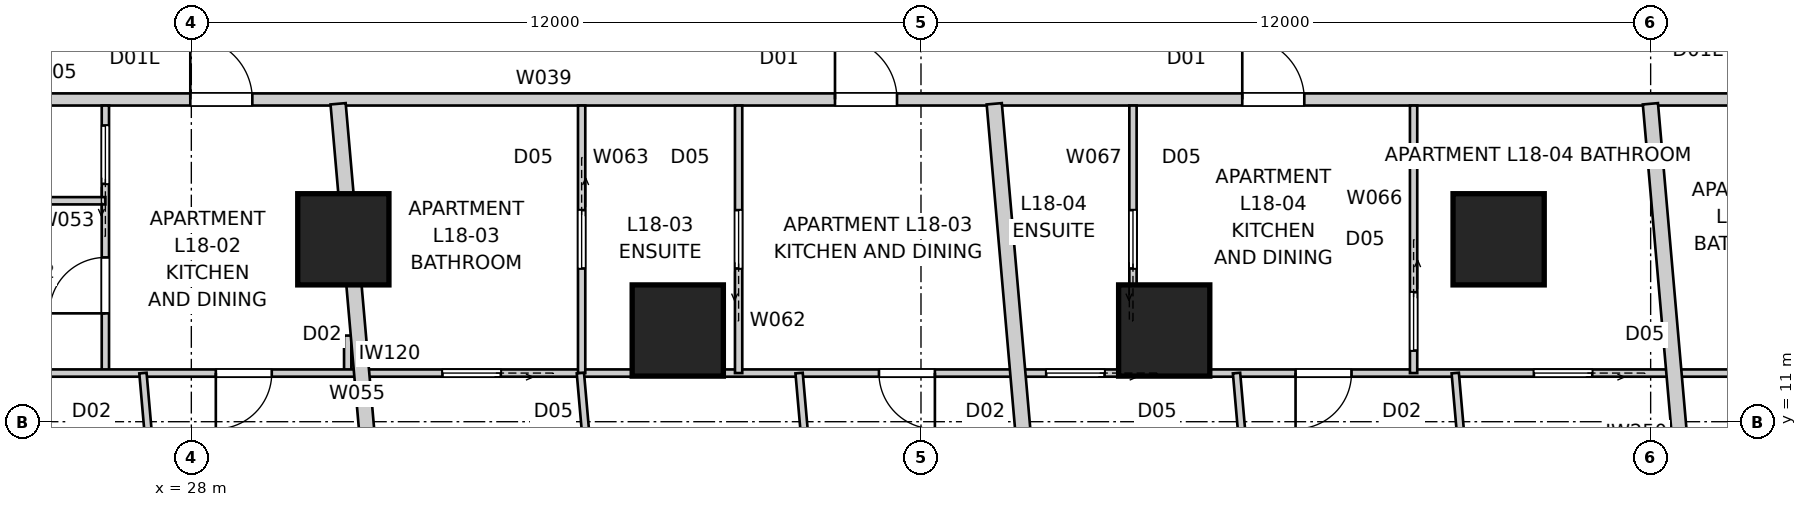
"""IFC4 building model, lengths in metres.
Left out: names, types, materials, properties, quantities, classifications, styles, units other than length and angle.
Written with IfcOpenShell. Run it as: python <this file> out.ifc"""

import sys

from ifc_helpers import new_model, si_unit, direction, frame, frame_2d, origin, origin_2d, place, context, subcontext, project, spatial, rectangle, extrude, element, fill, save


model = new_model("IFC4")
c1 = context("Model", 3, precision=1e-05, world=origin(), true_north=direction((0.0, 1.0)))
c2 = subcontext(c1, "Body", "Model", "MODEL_VIEW")
j1 = project(units=[si_unit("LENGTHUNIT", "METRE"), si_unit("PLANEANGLEUNIT", "RADIAN")], contexts=[c1])
p1 = place(None, origin())
s1 = spatial("IfcSite", under=j1, at=p1, CompositionType="ELEMENT")
p2 = place(p1, origin())
s2 = spatial("IfcBuilding", under=s1, at=p2, CompositionType="ELEMENT")
p3 = place(p2, frame((0.0, 0.0, 67.6)))
s3 = spatial("IfcBuildingStorey", under=s2, at=p3, CompositionType="ELEMENT", Elevation=67.6)
for number, where, z_axis, x_axis in (
    (1, (30.5, 14.0, 0.0), (0.0, 0.0, 1.0), (1.0, 0.0, 0.0)),
    (2, (36.0, 12.5, 0.0), (0.0, 0.0, 1.0), (1.0, 0.0, 0.0)),
    (3, (44.0, 12.5, 0.0), (0.0, 0.0, 1.0), (1.0, 0.0, 0.0)),
    (4, (49.5, 14.0, 0.0), (0.0, 0.0, 1.0), (1.0, 0.0, 0.0)),
):
    element("IfcColumn", number, at=place(p3, frame(where, z_axis=z_axis, x_axis=x_axis)), inside=s3, PredefinedType="COLUMN", context=c2, shape_type="SweptSolid", body=[
        extrude(rectangle(XDim=1.5, YDim=1.5, at=origin_2d()), origin(), (0.0, 0.0, 1.0), 3.4),
    ])
p4 = place(p3, frame((25.5, 16.3, 0.0), z_axis=(0.0, 0.0, 1.0), x_axis=(1.0, 0.0, 0.0)))
e5 = element("IfcWall", 5, at=p4, inside=s3, PredefinedType="PARTITIONING", context=c2, shape_type="SweptSolid", body=[
    extrude(rectangle(XDim=28.2, YDim=0.2, at=frame_2d((14.1, 0.0))), origin(), (0.0, 0.0, 1.0), 3.25),
])
p5 = place(p4, frame((19.784, 0.0, 0.0)))
e6 = element("IfcOpeningElement", 6, at=p5, cuts=e5, PredefinedType="OPENING", context=c2, shape_type="SweptSolid", body=[
    extrude(rectangle(XDim=1.02, YDim=2.34, at=frame_2d((0.51, 1.17))), frame((0.0, 0.11, 0.0), z_axis=(0.0, -1.0, 0.0), x_axis=(1.0, 0.0, 0.0)), (0.0, 0.0, 1.0), 0.22),
])
p6 = place(p4, frame((13.086, 0.0, 0.0)))
e7 = element("IfcOpeningElement", 7, at=p6, cuts=e5, PredefinedType="OPENING", context=c2, shape_type="SweptSolid", body=[
    extrude(rectangle(XDim=1.02, YDim=2.34, at=frame_2d((0.51, 1.17))), frame((0.0, 0.11, 0.0), z_axis=(0.0, -1.0, 0.0), x_axis=(1.0, 0.0, 0.0)), (0.0, 0.0, 1.0), 0.22),
])
p7 = place(p4, frame((2.483, 0.0, 0.0)))
e8 = element("IfcOpeningElement", 8, at=p7, cuts=e5, PredefinedType="OPENING", context=c2, shape_type="SweptSolid", body=[
    extrude(rectangle(XDim=1.02, YDim=2.1, at=frame_2d((0.51, 1.05))), frame((0.0, 0.11, 0.0), z_axis=(0.0, -1.0, 0.0), x_axis=(1.0, 0.0, 0.0)), (0.0, 0.0, 1.0), 0.22),
])
p8 = place(p3, frame((42.222, 4.597, 0.0), z_axis=(0.0, 0.0, 1.0), x_axis=(-0.087147497287, 0.996195419442, 0.0)))
e9 = element("IfcWall", 9, at=p8, inside=s3, PredefinedType="PARTITIONING", context=c2, shape_type="SweptSolid", body=[
    extrude(rectangle(XDim=11.677, YDim=0.25, at=frame_2d((5.838, 0.0))), origin(), (0.0, 0.0, 1.0), 3.25),
])
p9 = place(p3, frame((52.932, 5.534, 0.0), z_axis=(0.0, 0.0, 1.0), x_axis=(-0.08716441141, 0.996193939644, 0.0)))
e10 = element("IfcWall", 10, at=p9, inside=s3, PredefinedType="PARTITIONING", context=c2, shape_type="SweptSolid", body=[
    extrude(rectangle(XDim=10.736, YDim=0.25, at=frame_2d((5.368, 0.0))), origin(), (0.0, 0.0, 1.0), 3.25),
])
p10 = place(p3, frame((31.513, 3.66, 0.0), z_axis=(0.0, 0.0, 1.0), x_axis=(-0.087153988028, 0.996194851608, 0.0)))
e11 = element("IfcWall", 11, at=p10, inside=s3, PredefinedType="PARTITIONING", context=c2, shape_type="SweptSolid", body=[
    extrude(rectangle(XDim=12.617, YDim=0.25, at=frame_2d((6.309, 0.0))), origin(), (0.0, 0.0, 1.0), 3.25),
])
p11 = place(p3, frame((26.586, 11.8, 0.0), z_axis=(0.0, 0.0, 1.0), x_axis=(0.0, 1.0, 0.0)))
e12 = element("IfcWall", 12, at=p11, inside=s3, PredefinedType="PARTITIONING", context=c2, shape_type="SweptSolid", body=[
    extrude(rectangle(XDim=4.4, YDim=0.12, at=frame_2d((2.2, 0.0))), origin(), (0.0, 0.0, 1.0), 3.25),
])
p12 = place(p11, frame((0.982, 0.0, 0.0)))
e13 = element("IfcOpeningElement", 13, at=p12, cuts=e12, PredefinedType="OPENING", context=c2, shape_type="SweptSolid", body=[
    extrude(rectangle(XDim=0.92, YDim=2.34, at=frame_2d((0.46, 1.17))), frame((0.0, 0.07, 0.0), z_axis=(0.0, -1.0, 0.0), x_axis=(1.0, 0.0, 0.0)), (0.0, 0.0, 1.0), 0.14),
])
p13 = place(p11, frame((3.112, 0.0, 0.0)))
e14 = element("IfcOpeningElement", 14, at=p13, cuts=e12, PredefinedType="OPENING", context=c2, shape_type="SweptSolid", body=[
    extrude(rectangle(XDim=0.96, YDim=2.1, at=frame_2d((0.48, 1.05))), frame((0.0, 0.07, 0.0), z_axis=(0.0, -1.0, 0.0), x_axis=(1.0, 0.0, 0.0)), (0.0, 0.0, 1.0), 0.14),
])
p14 = place(p3, frame((30.572, 12.417, 0.0), z_axis=(0.0, 0.0, 1.0), x_axis=(0.0, -1.0, 0.0)))
e15 = element("IfcWall", 15, at=p14, inside=s3, PredefinedType="PARTITIONING", context=c2, shape_type="SweptSolid", body=[
    extrude(rectangle(XDim=0.617, YDim=0.12, at=frame_2d((0.308, 0.0))), origin(), (0.0, 0.0, 1.0), 3.25),
])
p15 = place(p3, frame((58.2, 11.8, 0.0), z_axis=(0.0, 0.0, 1.0), x_axis=(-1.0, 0.0, 0.0)))
e16 = element("IfcWall", 16, at=p15, inside=s3, PredefinedType="PARTITIONING", context=c2, shape_type="SweptSolid", body=[
    extrude(rectangle(XDim=36.4, YDim=0.12, at=frame_2d((18.2, 0.0))), origin(), (0.0, 0.0, 1.0), 3.25),
])
p16 = place(p15, frame((11.12, 0.0, 0.0)))
e17 = element("IfcOpeningElement", 17, at=p16, cuts=e16, PredefinedType="OPENING", context=c2, shape_type="SweptSolid", body=[
    extrude(rectangle(XDim=0.92, YDim=2.34, at=frame_2d((0.46, 1.17))), frame((0.0, 0.07, 0.0), z_axis=(0.0, -1.0, 0.0), x_axis=(1.0, 0.0, 0.0)), (0.0, 0.0, 1.0), 0.14),
])
p17 = place(p15, frame((17.971, 0.0, 0.0)))
e18 = element("IfcOpeningElement", 18, at=p17, cuts=e16, PredefinedType="OPENING", context=c2, shape_type="SweptSolid", body=[
    extrude(rectangle(XDim=0.92, YDim=2.34, at=frame_2d((0.46, 1.17))), frame((0.0, 0.07, 0.0), z_axis=(0.0, -1.0, 0.0), x_axis=(1.0, 0.0, 0.0)), (0.0, 0.0, 1.0), 0.14),
])
p18 = place(p15, frame((28.877, 0.0, 0.0)))
e19 = element("IfcOpeningElement", 19, at=p18, cuts=e16, PredefinedType="OPENING", context=c2, shape_type="SweptSolid", body=[
    extrude(rectangle(XDim=0.92, YDim=2.34, at=frame_2d((0.46, 1.17))), frame((0.0, 0.07, 0.0), z_axis=(0.0, -1.0, 0.0), x_axis=(1.0, 0.0, 0.0)), (0.0, 0.0, 1.0), 0.14),
])
p19 = place(p15, frame((7.16, 0.0, 0.0)))
e20 = element("IfcOpeningElement", 20, at=p19, cuts=e16, PredefinedType="OPENING", context=c2, shape_type="SweptSolid", body=[
    extrude(rectangle(XDim=0.96, YDim=2.1, at=frame_2d((0.48, 1.05))), frame((0.0, 0.07, 0.0), z_axis=(0.0, -1.0, 0.0), x_axis=(1.0, 0.0, 0.0)), (0.0, 0.0, 1.0), 0.14),
])
p20 = place(p15, frame((15.181, 0.0, 0.0)))
e21 = element("IfcOpeningElement", 21, at=p20, cuts=e16, PredefinedType="OPENING", context=c2, shape_type="SweptSolid", body=[
    extrude(rectangle(XDim=0.96, YDim=2.1, at=frame_2d((0.48, 1.05))), frame((0.0, 0.07, 0.0), z_axis=(0.0, -1.0, 0.0), x_axis=(1.0, 0.0, 0.0)), (0.0, 0.0, 1.0), 0.14),
])
p21 = place(p15, frame((32.668, 0.0, 0.0)))
e22 = element("IfcOpeningElement", 22, at=p21, cuts=e16, PredefinedType="OPENING", context=c2, shape_type="SweptSolid", body=[
    extrude(rectangle(XDim=0.92, YDim=2.34, at=frame_2d((0.46, 1.17))), frame((0.0, 0.07, 0.0), z_axis=(0.0, -1.0, 0.0), x_axis=(1.0, 0.0, 0.0)), (0.0, 0.0, 1.0), 0.14),
])
p22 = place(p15, frame((35.011, 0.0, 0.0)))
e23 = element("IfcOpeningElement", 23, at=p22, cuts=e16, PredefinedType="OPENING", context=c2, shape_type="SweptSolid", body=[
    extrude(rectangle(XDim=0.92, YDim=2.34, at=frame_2d((0.46, 1.17))), frame((0.0, 0.07, 0.0), z_axis=(0.0, -1.0, 0.0), x_axis=(1.0, 0.0, 0.0)), (0.0, 0.0, 1.0), 0.14),
])
p23 = place(p15, frame((0.675, 0.0, 0.0)))
e24 = element("IfcOpeningElement", 24, at=p23, cuts=e16, PredefinedType="OPENING", context=c2, shape_type="SweptSolid", body=[
    extrude(rectangle(XDim=0.92, YDim=2.34, at=frame_2d((0.46, 1.17))), frame((0.0, 0.07, 0.0), z_axis=(0.0, -1.0, 0.0), x_axis=(1.0, 0.0, 0.0)), (0.0, 0.0, 1.0), 0.14),
])
p24 = place(p15, frame((25.11, 0.0, 0.0)))
e25 = element("IfcOpeningElement", 25, at=p24, cuts=e16, PredefinedType="OPENING", context=c2, shape_type="SweptSolid", body=[
    extrude(rectangle(XDim=0.96, YDim=2.1, at=frame_2d((0.48, 1.05))), frame((0.0, 0.07, 0.0), z_axis=(0.0, -1.0, 0.0), x_axis=(1.0, 0.0, 0.0)), (0.0, 0.0, 1.0), 0.14),
])
p25 = place(p15, frame((3.904, 0.0, 0.0)))
e26 = element("IfcOpeningElement", 26, at=p25, cuts=e16, PredefinedType="OPENING", context=c2, shape_type="SweptSolid", body=[
    extrude(rectangle(XDim=0.96, YDim=2.1, at=frame_2d((0.48, 1.05))), frame((0.0, 0.07, 0.0), z_axis=(0.0, -1.0, 0.0), x_axis=(1.0, 0.0, 0.0)), (0.0, 0.0, 1.0), 0.14),
])
p26 = place(p3, frame((26.586, 14.634, 0.0), z_axis=(0.0, 0.0, 1.0), x_axis=(-1.0, 0.0, 0.0)))
e27 = element("IfcWall", 27, at=p26, inside=s3, PredefinedType="PARTITIONING", context=c2, shape_type="SweptSolid", body=[
    extrude(rectangle(XDim=4.786, YDim=0.12, at=frame_2d((2.393, 0.0))), origin(), (0.0, 0.0, 1.0), 3.25),
])
p27 = place(p3, frame((27.204, 11.8, 0.0), z_axis=(0.0, 0.0, 1.0), x_axis=(0.087167308925, -0.996193686115, 0.0)))
e28 = element("IfcWall", 28, at=p27, inside=s3, PredefinedType="PARTITIONING", context=c2, shape_type="SweptSolid", body=[
    extrude(rectangle(XDim=8.445, YDim=0.12, at=frame_2d((4.222, 0.0))), origin(), (0.0, 0.0, 1.0), 2.638),
])
p28 = place(p3, frame((37.0, 11.8, 0.0), z_axis=(0.0, 0.0, 1.0), x_axis=(0.0, 1.0, 0.0)))
e29 = element("IfcWall", 29, at=p28, inside=s3, PredefinedType="PARTITIONING", context=c2, shape_type="SweptSolid", body=[
    extrude(rectangle(XDim=4.4, YDim=0.12, at=frame_2d((2.2, 0.0))), origin(), (0.0, 0.0, 1.0), 2.796),
])
p29 = place(p28, frame((1.72, 0.0, 0.0)))
e30 = element("IfcOpeningElement", 30, at=p29, cuts=e29, PredefinedType="OPENING", context=c2, shape_type="SweptSolid", body=[
    extrude(rectangle(XDim=0.96, YDim=2.1, at=frame_2d((0.48, 1.05))), frame((0.0, 0.07, 0.0), z_axis=(0.0, -1.0, 0.0), x_axis=(1.0, 0.0, 0.0)), (0.0, 0.0, 1.0), 0.14),
])
p30 = place(p3, frame((34.419, 16.2, 0.0), z_axis=(0.0, 0.0, 1.0), x_axis=(0.0, -1.0, 0.0)))
e31 = element("IfcWall", 31, at=p30, inside=s3, PredefinedType="PARTITIONING", context=c2, shape_type="SweptSolid", body=[
    extrude(rectangle(XDim=4.4, YDim=0.12, at=frame_2d((2.2, 0.0))), origin(), (0.0, 0.0, 1.0), 3.25),
])
p31 = place(p30, frame((1.72, 0.0, 0.0)))
e32 = element("IfcOpeningElement", 32, at=p31, cuts=e31, PredefinedType="OPENING", context=c2, shape_type="SweptSolid", body=[
    extrude(rectangle(XDim=0.96, YDim=2.1, at=frame_2d((0.48, 1.05))), frame((0.0, 0.07, 0.0), z_axis=(0.0, -1.0, 0.0), x_axis=(1.0, 0.0, 0.0)), (0.0, 0.0, 1.0), 0.14),
])
p32 = place(p3, frame((34.398, 11.8, 0.0), z_axis=(0.0, 0.0, 1.0), x_axis=(0.087161914023, -0.996194158156, 0.0)))
e33 = element("IfcWall", 33, at=p32, inside=s3, PredefinedType="PARTITIONING", context=c2, shape_type="SweptSolid", body=[
    extrude(rectangle(XDim=7.818, YDim=0.12, at=frame_2d((3.909, 0.0))), origin(), (0.0, 0.0, 1.0), 3.25),
])
p33 = place(p32, frame((3.469, 0.0, 0.0)))
e34 = element("IfcOpeningElement", 34, at=p33, cuts=e33, PredefinedType="OPENING", context=c2, shape_type="SweptSolid", body=[
    extrude(rectangle(XDim=0.92, YDim=2.34, at=frame_2d((0.46, 1.17))), frame((0.0, 0.07, 0.0), z_axis=(0.0, -1.0, 0.0), x_axis=(1.0, 0.0, 0.0)), (0.0, 0.0, 1.0), 0.14),
])
p34 = place(p3, frame((37.995, 11.8, 0.0), z_axis=(0.0, 0.0, 1.0), x_axis=(0.08715887855, -0.99619442374, 0.0)))
e35 = element("IfcWall", 35, at=p34, inside=s3, PredefinedType="PARTITIONING", context=c2, shape_type="SweptSolid", body=[
    extrude(rectangle(XDim=7.504, YDim=0.12, at=frame_2d((3.752, 0.0))), origin(), (0.0, 0.0, 1.0), 3.25),
])
p35 = place(p3, frame((48.101, 16.2, 0.0), z_axis=(0.0, 0.0, 1.0), x_axis=(0.0, -1.0, 0.0)))
e36 = element("IfcWall", 36, at=p35, inside=s3, PredefinedType="PARTITIONING", context=c2, shape_type="SweptSolid", body=[
    extrude(rectangle(XDim=4.4, YDim=0.12, at=frame_2d((2.2, 0.0))), origin(), (0.0, 0.0, 1.0), 3.25),
])
p36 = place(p35, frame((3.07, 0.0, 0.0)))
e37 = element("IfcOpeningElement", 37, at=p36, cuts=e36, PredefinedType="OPENING", context=c2, shape_type="SweptSolid", body=[
    extrude(rectangle(XDim=0.96, YDim=2.1, at=frame_2d((0.48, 1.05))), frame((0.0, 0.07, 0.0), z_axis=(0.0, -1.0, 0.0), x_axis=(1.0, 0.0, 0.0)), (0.0, 0.0, 1.0), 0.14),
])
p37 = place(p3, frame((43.486, 11.8, 0.0), z_axis=(0.0, 0.0, 1.0), x_axis=(0.0, 1.0, 0.0)))
e38 = element("IfcWall", 38, at=p37, inside=s3, PredefinedType="PARTITIONING", context=c2, shape_type="SweptSolid", body=[
    extrude(rectangle(XDim=4.4, YDim=0.12, at=frame_2d((2.2, 0.0))), origin(), (0.0, 0.0, 1.0), 3.25),
])
p38 = place(p37, frame((1.72, 0.0, 0.0)))
e39 = element("IfcOpeningElement", 39, at=p38, cuts=e38, PredefinedType="OPENING", context=c2, shape_type="SweptSolid", body=[
    extrude(rectangle(XDim=0.96, YDim=2.1, at=frame_2d((0.48, 1.05))), frame((0.0, 0.07, 0.0), z_axis=(0.0, -1.0, 0.0), x_axis=(1.0, 0.0, 0.0)), (0.0, 0.0, 1.0), 0.14),
])
p39 = place(p3, frame((45.189, 11.8, 0.0), z_axis=(0.0, 0.0, 1.0), x_axis=(0.087190290923, -0.996191674914, 0.0)))
e40 = element("IfcWall", 40, at=p39, inside=s3, PredefinedType="PARTITIONING", context=c2, shape_type="SweptSolid", body=[
    extrude(rectangle(XDim=6.877, YDim=0.12, at=frame_2d((3.438, 0.0))), origin(), (0.0, 0.0, 1.0), 3.25),
])
p40 = place(p3, frame((48.786, 11.8, 0.0), z_axis=(0.0, 0.0, 1.0), x_axis=(0.087151261897, -0.996195090105, 0.0)))
e41 = element("IfcWall", 41, at=p40, inside=s3, PredefinedType="PARTITIONING", context=c2, shape_type="SweptSolid", body=[
    extrude(rectangle(XDim=6.563, YDim=0.12, at=frame_2d((3.282, 0.0))), origin(), (0.0, 0.0, 1.0), 3.25),
])
p41 = place(p5, origin())
e42 = element("IfcDoor", 42, at=p41, inside=s3, OperationType="SINGLE_SWING_LEFT", PredefinedType="DOOR", context=c2, shape_type="SweptSolid", body=[
    extrude(rectangle(XDim=1.02, YDim=2.34, at=frame_2d((0.51, 1.17))), frame((0.0, 0.025, 0.0), z_axis=(0.0, -1.0, 0.0), x_axis=(1.0, 0.0, 0.0)), (0.0, 0.0, 1.0), 0.05),
])
fill(e6, e42)
p42 = place(p6, origin())
e43 = element("IfcDoor", 43, at=p42, inside=s3, OperationType="SINGLE_SWING_LEFT", PredefinedType="DOOR", context=c2, shape_type="SweptSolid", body=[
    extrude(rectangle(XDim=1.02, YDim=2.34, at=frame_2d((0.51, 1.17))), frame((0.0, 0.025, 0.0), z_axis=(0.0, -1.0, 0.0), x_axis=(1.0, 0.0, 0.0)), (0.0, 0.0, 1.0), 0.05),
])
fill(e7, e43)
p43 = place(p7, origin())
e44 = element("IfcDoor", 44, at=p43, inside=s3, OperationType="SINGLE_SWING_LEFT", PredefinedType="DOOR", context=c2, shape_type="SweptSolid", body=[
    extrude(rectangle(XDim=1.02, YDim=2.1, at=frame_2d((0.51, 1.05))), frame((0.0, 0.025, 0.0), z_axis=(0.0, -1.0, 0.0), x_axis=(1.0, 0.0, 0.0)), (0.0, 0.0, 1.0), 0.05),
])
fill(e8, e44)
p44 = place(p36, origin())
e45 = element("IfcDoor", 45, at=p44, inside=s3, OperationType="SLIDING_TO_LEFT", PredefinedType="DOOR", context=c2, shape_type="SweptSolid", body=[
    extrude(rectangle(XDim=0.96, YDim=2.1, at=frame_2d((0.48, 1.05))), frame((0.0, 0.025, 0.0), z_axis=(0.0, -1.0, 0.0), x_axis=(1.0, 0.0, 0.0)), (0.0, 0.0, 1.0), 0.05),
])
fill(e37, e45)
p45 = place(p38, origin())
e46 = element("IfcDoor", 46, at=p45, inside=s3, OperationType="SLIDING_TO_LEFT", PredefinedType="DOOR", context=c2, shape_type="SweptSolid", body=[
    extrude(rectangle(XDim=0.96, YDim=2.1, at=frame_2d((0.48, 1.05))), frame((0.0, 0.025, 0.0), z_axis=(0.0, -1.0, 0.0), x_axis=(1.0, 0.0, 0.0)), (0.0, 0.0, 1.0), 0.05),
])
fill(e39, e46)
p46 = place(p16, origin())
e47 = element("IfcDoor", 47, at=p46, inside=s3, OperationType="SINGLE_SWING_RIGHT", PredefinedType="DOOR", context=c2, shape_type="SweptSolid", body=[
    extrude(rectangle(XDim=0.92, YDim=2.34, at=frame_2d((0.46, 1.17))), frame((0.0, 0.025, 0.0), z_axis=(0.0, -1.0, 0.0), x_axis=(1.0, 0.0, 0.0)), (0.0, 0.0, 1.0), 0.05),
])
fill(e17, e47)
p47 = place(p29, origin())
e48 = element("IfcDoor", 48, at=p47, inside=s3, OperationType="SLIDING_TO_LEFT", PredefinedType="DOOR", context=c2, shape_type="SweptSolid", body=[
    extrude(rectangle(XDim=0.96, YDim=2.1, at=frame_2d((0.48, 1.05))), frame((0.0, 0.025, 0.0), z_axis=(0.0, -1.0, 0.0), x_axis=(1.0, 0.0, 0.0)), (0.0, 0.0, 1.0), 0.05),
])
fill(e30, e48)
p48 = place(p17, origin())
e49 = element("IfcDoor", 49, at=p48, inside=s3, OperationType="SINGLE_SWING_LEFT", PredefinedType="DOOR", context=c2, shape_type="SweptSolid", body=[
    extrude(rectangle(XDim=0.92, YDim=2.34, at=frame_2d((0.46, 1.17))), frame((0.0, 0.025, 0.0), z_axis=(0.0, -1.0, 0.0), x_axis=(1.0, 0.0, 0.0)), (0.0, 0.0, 1.0), 0.05),
])
fill(e18, e49)
p49 = place(p18, origin())
e50 = element("IfcDoor", 50, at=p49, inside=s3, OperationType="SINGLE_SWING_RIGHT", PredefinedType="DOOR", context=c2, shape_type="SweptSolid", body=[
    extrude(rectangle(XDim=0.92, YDim=2.34, at=frame_2d((0.46, 1.17))), frame((0.0, 0.025, 0.0), z_axis=(0.0, -1.0, 0.0), x_axis=(1.0, 0.0, 0.0)), (0.0, 0.0, 1.0), 0.05),
])
fill(e19, e50)
p50 = place(p12, origin())
e51 = element("IfcDoor", 51, at=p50, inside=s3, OperationType="SINGLE_SWING_LEFT", PredefinedType="DOOR", context=c2, shape_type="SweptSolid", body=[
    extrude(rectangle(XDim=0.92, YDim=2.34, at=frame_2d((0.46, 1.17))), frame((0.0, 0.025, 0.0), z_axis=(0.0, -1.0, 0.0), x_axis=(1.0, 0.0, 0.0)), (0.0, 0.0, 1.0), 0.05),
])
fill(e13, e51)
p51 = place(p13, origin())
e52 = element("IfcDoor", 52, at=p51, inside=s3, OperationType="SLIDING_TO_LEFT", PredefinedType="DOOR", context=c2, shape_type="SweptSolid", body=[
    extrude(rectangle(XDim=0.96, YDim=2.1, at=frame_2d((0.48, 1.05))), frame((0.0, 0.025, 0.0), z_axis=(0.0, -1.0, 0.0), x_axis=(1.0, 0.0, 0.0)), (0.0, 0.0, 1.0), 0.05),
])
fill(e14, e52)
p52 = place(p19, origin())
e53 = element("IfcDoor", 53, at=p52, inside=s3, OperationType="SLIDING_TO_LEFT", PredefinedType="DOOR", context=c2, shape_type="SweptSolid", body=[
    extrude(rectangle(XDim=0.96, YDim=2.1, at=frame_2d((0.48, 1.05))), frame((0.0, 0.025, 0.0), z_axis=(0.0, -1.0, 0.0), x_axis=(1.0, 0.0, 0.0)), (0.0, 0.0, 1.0), 0.05),
])
fill(e20, e53)
p53 = place(p20, origin())
e54 = element("IfcDoor", 54, at=p53, inside=s3, OperationType="SLIDING_TO_LEFT", PredefinedType="DOOR", context=c2, shape_type="SweptSolid", body=[
    extrude(rectangle(XDim=0.96, YDim=2.1, at=frame_2d((0.48, 1.05))), frame((0.0, 0.025, 0.0), z_axis=(0.0, -1.0, 0.0), x_axis=(1.0, 0.0, 0.0)), (0.0, 0.0, 1.0), 0.05),
])
fill(e21, e54)
p54 = place(p31, origin())
e55 = element("IfcDoor", 55, at=p54, inside=s3, OperationType="SLIDING_TO_LEFT", PredefinedType="DOOR", context=c2, shape_type="SweptSolid", body=[
    extrude(rectangle(XDim=0.96, YDim=2.1, at=frame_2d((0.48, 1.05))), frame((0.0, 0.025, 0.0), z_axis=(0.0, -1.0, 0.0), x_axis=(1.0, 0.0, 0.0)), (0.0, 0.0, 1.0), 0.05),
])
fill(e32, e55)
p55 = place(p24, origin())
e56 = element("IfcDoor", 56, at=p55, inside=s3, OperationType="SLIDING_TO_LEFT", PredefinedType="DOOR", context=c2, shape_type="SweptSolid", body=[
    extrude(rectangle(XDim=0.96, YDim=2.1, at=frame_2d((0.48, 1.05))), frame((0.0, 0.025, 0.0), z_axis=(0.0, -1.0, 0.0), x_axis=(1.0, 0.0, 0.0)), (0.0, 0.0, 1.0), 0.05),
])
fill(e25, e56)
save(model, sys.argv[1])
